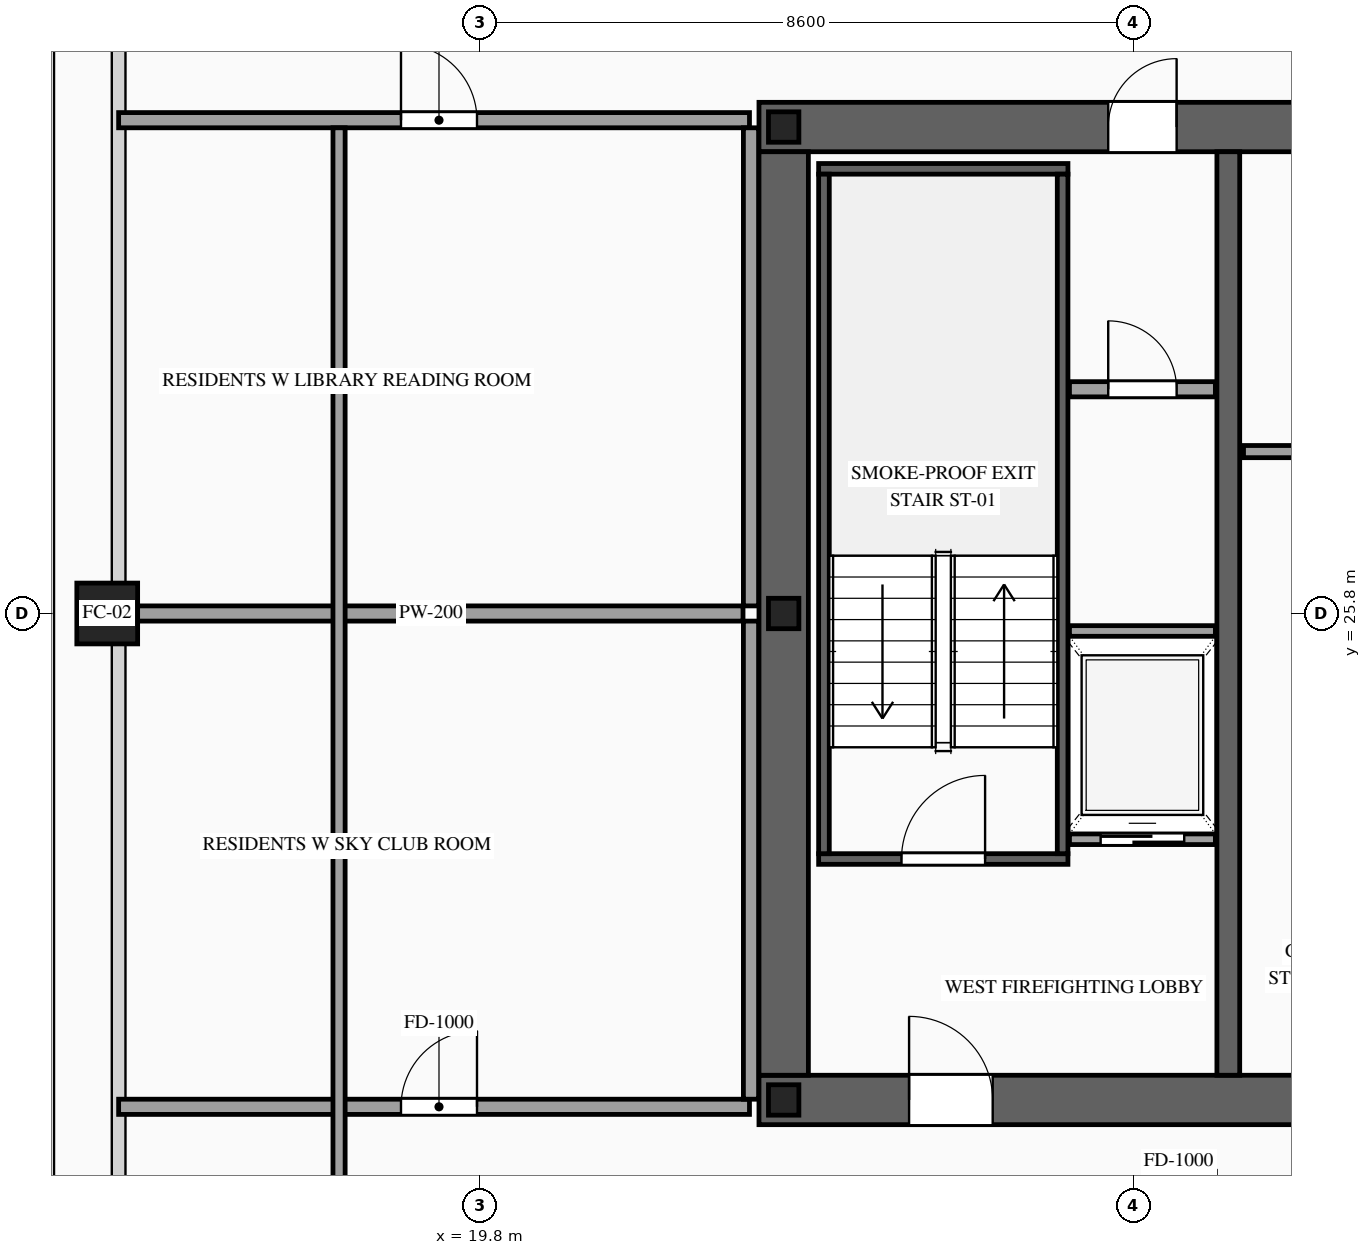
"""IFC4 building model, lengths in metres.
Left out: names, types, materials, properties, quantities, classifications, styles, units other than length and angle.
Written with IfcOpenShell. Run it as: python <this file> out.ifc"""

import sys

from ifc_helpers import new_model, si_unit, direction, frame, frame_2d, origin, origin_2d, place, context, subcontext, project, spatial, rectangle, hollow_rectangle, i_section, extrude, source, transform, mapped, element, fill, save


model = new_model("IFC4")
c1 = context("Model", 3, precision=1e-05, world=origin(), true_north=direction((0.0, 1.0)))
c2 = subcontext(c1, "Body", "Model", "MODEL_VIEW")
j1 = project(units=[si_unit("LENGTHUNIT", "METRE"), si_unit("PLANEANGLEUNIT", "RADIAN")], contexts=[c1])
p1 = place(None, origin())
s1 = spatial("IfcSite", under=j1, at=p1, CompositionType="ELEMENT")
p2 = place(p1, origin())
s2 = spatial("IfcBuilding", under=s1, at=p2, CompositionType="ELEMENT")
p3 = place(p2, frame((0.0, 0.0, 191.5)))
s3 = spatial("IfcBuildingStorey", under=s2, at=p3, CompositionType="ELEMENT", Elevation=191.5)
p4 = place(p3, frame((23.475, 19.4, 0.0), z_axis=(0.0, 0.0, 1.0), x_axis=(1.0, 0.0, 0.0)))
e1 = element("IfcWall", 1, at=p4, inside=s3, PredefinedType="SHEAR", context=c2, shape_type="SweptSolid", body=[
    extrude(rectangle(XDim=27.05, YDim=0.65, at=frame_2d((13.525, 0.0))), origin(), (0.0, 0.0, 1.0), 3.5),
])
p5 = place(p4, frame((1.975, 0.0, 0.0)))
e2 = element("IfcOpeningElement", 2, at=p5, cuts=e1, PredefinedType="OPENING", context=c2, shape_type="SweptSolid", body=[
    extrude(rectangle(XDim=1.1, YDim=2.2, at=frame_2d((0.55, 1.1))), frame((0.0, 0.34, 0.0), z_axis=(0.0, -1.0, 0.0), x_axis=(1.0, 0.0, 0.0)), (0.0, 0.0, 1.0), 0.68),
])
p6 = place(p4, frame((9.875, 0.0, 0.0)))
e3 = element("IfcOpeningElement", 3, at=p6, cuts=e1, PredefinedType="OPENING", context=c2, shape_type="SweptSolid", body=[
    extrude(rectangle(XDim=1.1, YDim=2.2, at=frame_2d((0.55, 1.1))), frame((0.0, 0.34, 0.0), z_axis=(0.0, -1.0, 0.0), x_axis=(1.0, 0.0, 0.0)), (0.0, 0.0, 1.0), 0.68),
])
p7 = place(p4, frame((23.075, 0.0, 0.0)))
e4 = element("IfcOpeningElement", 4, at=p7, cuts=e1, PredefinedType="OPENING", context=c2, shape_type="SweptSolid", body=[
    extrude(rectangle(XDim=1.1, YDim=2.2, at=frame_2d((0.55, 1.1))), frame((0.0, 0.34, 0.0), z_axis=(0.0, -1.0, 0.0), x_axis=(1.0, 0.0, 0.0)), (0.0, 0.0, 1.0), 0.68),
])
p8 = place(p4, frame((19.695, 0.0, 0.0)))
e5 = element("IfcOpeningElement", 5, at=p8, cuts=e1, PredefinedType="OPENING", context=c2, shape_type="SweptSolid", body=[
    extrude(rectangle(XDim=0.9, YDim=2.15, at=frame_2d((0.45, 1.075))), frame((0.0, 0.34, 0.0), z_axis=(0.0, -1.0, 0.0), x_axis=(1.0, 0.0, 0.0)), (0.0, 0.0, 1.0), 0.68),
])
p9 = place(p4, frame((18.255, 0.0, 0.0)))
e6 = element("IfcOpeningElement", 6, at=p9, cuts=e1, PredefinedType="OPENING", context=c2, shape_type="SweptSolid", body=[
    extrude(rectangle(XDim=0.9, YDim=2.15, at=frame_2d((0.45, 1.075))), frame((0.0, 0.34, 0.0), z_axis=(0.0, -1.0, 0.0), x_axis=(1.0, 0.0, 0.0)), (0.0, 0.0, 1.0), 0.68),
])
p10 = place(p3, frame((23.475, 32.2, 0.0), z_axis=(0.0, 0.0, 1.0), x_axis=(1.0, 0.0, 0.0)))
e7 = element("IfcWall", 7, at=p10, inside=s3, PredefinedType="SHEAR", context=c2, shape_type="SweptSolid", body=[
    extrude(rectangle(XDim=27.05, YDim=0.65, at=frame_2d((13.525, 0.0))), origin(), (0.0, 0.0, 1.0), 3.5),
])
p11 = place(p10, frame((4.595, 0.0, 0.0)))
e8 = element("IfcOpeningElement", 8, at=p11, cuts=e7, PredefinedType="OPENING", context=c2, shape_type="SweptSolid", body=[
    extrude(rectangle(XDim=0.9, YDim=2.15, at=frame_2d((0.45, 1.075))), frame((0.0, 0.34, 0.0), z_axis=(0.0, -1.0, 0.0), x_axis=(1.0, 0.0, 0.0)), (0.0, 0.0, 1.0), 0.68),
])
p12 = place(p10, frame((9.875, 0.0, 0.0)))
e9 = element("IfcOpeningElement", 9, at=p12, cuts=e7, PredefinedType="OPENING", context=c2, shape_type="SweptSolid", body=[
    extrude(rectangle(XDim=1.1, YDim=2.2, at=frame_2d((0.55, 1.1))), frame((0.0, 0.34, 0.0), z_axis=(0.0, -1.0, 0.0), x_axis=(1.0, 0.0, 0.0)), (0.0, 0.0, 1.0), 0.68),
])
p13 = place(p10, frame((15.725, 0.0, 0.0)))
e10 = element("IfcOpeningElement", 10, at=p13, cuts=e7, PredefinedType="OPENING", context=c2, shape_type="SweptSolid", body=[
    extrude(rectangle(XDim=1.1, YDim=2.2, at=frame_2d((0.55, 1.1))), frame((0.0, 0.34, 0.0), z_axis=(0.0, -1.0, 0.0), x_axis=(1.0, 0.0, 0.0)), (0.0, 0.0, 1.0), 0.68),
])
p14 = place(p10, frame((18.255, 0.0, 0.0)))
e11 = element("IfcOpeningElement", 11, at=p14, cuts=e7, PredefinedType="OPENING", context=c2, shape_type="SweptSolid", body=[
    extrude(rectangle(XDim=0.9, YDim=2.15, at=frame_2d((0.45, 1.075))), frame((0.0, 0.34, 0.0), z_axis=(0.0, -1.0, 0.0), x_axis=(1.0, 0.0, 0.0)), (0.0, 0.0, 1.0), 0.68),
])
p15 = place(p10, frame((19.695, 0.0, 0.0)))
e12 = element("IfcOpeningElement", 12, at=p15, cuts=e7, PredefinedType="OPENING", context=c2, shape_type="SweptSolid", body=[
    extrude(rectangle(XDim=0.9, YDim=2.15, at=frame_2d((0.45, 1.075))), frame((0.0, 0.34, 0.0), z_axis=(0.0, -1.0, 0.0), x_axis=(1.0, 0.0, 0.0)), (0.0, 0.0, 1.0), 0.68),
])
m1 = source(origin(), c2, "Body", "SweptSolid", [
    extrude(rectangle(XDim=12.15, YDim=0.65, at=frame_2d((6.075, 0.0))), origin(), (0.0, 0.0, 1.0), 3.5),
])
p16 = place(p3, frame((23.8, 19.725, 0.0), z_axis=(0.0, 0.0, 1.0), x_axis=(0.0, 1.0, 0.0)))
e13 = element("IfcWall", 13, at=p16, inside=s3, PredefinedType="SHEAR", context=c2, shape_type="MappedRepresentation", body=[
    mapped(m1, transform((0.0, 0.0, 0.0), scale=1.0)),
])
m2 = source(origin(), c2, "Body", "SweptSolid", [
    extrude(rectangle(XDim=12.15, YDim=0.3, at=frame_2d((6.075, 0.0))), origin(), (0.0, 0.0, 1.0), 3.5),
])
p17 = place(p3, frame((29.65, 19.725, 0.0), z_axis=(0.0, 0.0, 1.0), x_axis=(0.0, 1.0, 0.0)))
e14 = element("IfcWall", 14, at=p17, inside=s3, PredefinedType="SOLIDWALL", context=c2, shape_type="MappedRepresentation", body=[
    mapped(m2, transform((0.0, 0.0, 0.0), scale=1.0)),
])
m3 = source(origin(), c2, "Body", "SweptSolid", [
    extrude(i_section(OverallWidth=0.4, OverallDepth=0.4, WebThickness=0.013, FlangeThickness=0.021, at=origin_2d()), origin(), (0.0, 0.0, 1.0), 3.5),
])
for number, where, z_axis, x_axis in (
    (15, (23.8, 19.4, 0.0), (0.0, 0.0, 1.0), (1.0, 0.0, 0.0)),
    (16, (23.8, 25.8, 0.0), (0.0, 0.0, 1.0), (1.0, 0.0, 0.0)),
    (17, (23.8, 32.2, 0.0), (0.0, 0.0, 1.0), (1.0, 0.0, 0.0)),
):
    element("IfcColumn", number, at=place(p3, frame(where, z_axis=z_axis, x_axis=x_axis)), inside=s3, PredefinedType="COLUMN", context=c2, shape_type="MappedRepresentation", body=[
        mapped(m3, transform((0.0, 0.0, 0.0), scale=1.0)),
    ])
m4 = source(origin(), c2, "Body", "SweptSolid", [
    extrude(hollow_rectangle(XDim=0.8, YDim=0.8, WallThickness=0.036, at=origin_2d()), origin(), (0.0, 0.0, 1.0), 3.5),
])
p18 = place(p3, frame((14.9, 25.8, 0.0), z_axis=(0.0, 0.0, 1.0), x_axis=(1.0, 0.0, 0.0)))
e18 = element("IfcColumn", 18, at=p18, inside=s3, PredefinedType="COLUMN", context=c2, shape_type="MappedRepresentation", body=[
    mapped(m4, transform((0.0, 0.0, 0.0), scale=1.0)),
])
p19 = place(p3, frame((27.56, 22.83, 0.0), z_axis=(0.0, 0.0, 1.0), x_axis=(1.0, 0.0, 0.0)))
e19 = element("IfcWall", 19, at=p19, inside=s3, PredefinedType="SOLIDWALL", context=c2, shape_type="SweptSolid", body=[
    extrude(rectangle(XDim=1.92, YDim=0.14, at=frame_2d((0.96, 0.0))), origin(), (0.0, 0.0, 1.0), 3.28),
])
p20 = place(p19, frame((0.41, 0.0, 0.0)))
e20 = element("IfcOpeningElement", 20, at=p20, cuts=e19, PredefinedType="OPENING", context=c2, shape_type="SweptSolid", body=[
    extrude(rectangle(XDim=1.1, YDim=2.2, at=frame_2d((0.55, 1.1))), frame((0.0, 0.085, 0.0), z_axis=(0.0, -1.0, 0.0), x_axis=(1.0, 0.0, 0.0)), (0.0, 0.0, 1.0), 0.17),
])
m5 = source(origin(), c2, "Body", "SweptSolid", [
    extrude(rectangle(XDim=1.92, YDim=0.14, at=frame_2d((0.96, 0.0))), origin(), (0.0, 0.0, 1.0), 3.28),
])
p21 = place(p3, frame((27.56, 25.57, 0.0), z_axis=(0.0, 0.0, 1.0), x_axis=(1.0, 0.0, 0.0)))
e21 = element("IfcWall", 21, at=p21, inside=s3, PredefinedType="SOLIDWALL", context=c2, shape_type="MappedRepresentation", body=[
    mapped(m5, transform((0.0, 0.0, 0.0), scale=1.0)),
])
p22 = place(p3, frame((24.26, 22.57, 0.0), z_axis=(0.0, 0.0, 1.0), x_axis=(1.0, 0.0, 0.0)))
e22 = element("IfcWall", 22, at=p22, inside=s3, PredefinedType="SOLIDWALL", context=c2, shape_type="SweptSolid", body=[
    extrude(rectangle(XDim=3.28, YDim=0.14, at=frame_2d((1.64, 0.0))), origin(), (0.0, 0.0, 1.0), 3.28),
])
p23 = place(p22, frame((1.09, 0.0, 0.0)))
e23 = element("IfcOpeningElement", 23, at=p23, cuts=e22, PredefinedType="OPENING", context=c2, shape_type="SweptSolid", body=[
    extrude(rectangle(XDim=1.1, YDim=2.2, at=frame_2d((0.55, 1.1))), frame((0.0, 0.085, 0.0), z_axis=(0.0, -1.0, 0.0), x_axis=(1.0, 0.0, 0.0)), (0.0, 0.0, 1.0), 0.17),
])
m6 = source(origin(), c2, "Body", "SweptSolid", [
    extrude(rectangle(XDim=3.28, YDim=0.14, at=frame_2d((1.64, 0.0))), origin(), (0.0, 0.0, 1.0), 3.28),
])
p24 = place(p3, frame((24.26, 31.65, 0.0), z_axis=(0.0, 0.0, 1.0), x_axis=(1.0, 0.0, 0.0)))
e24 = element("IfcWall", 24, at=p24, inside=s3, PredefinedType="SOLIDWALL", context=c2, shape_type="MappedRepresentation", body=[
    mapped(m6, transform((0.0, 0.0, 0.0), scale=1.0)),
])
m7 = source(origin(), c2, "Body", "SweptSolid", [
    extrude(rectangle(XDim=8.94, YDim=0.14, at=frame_2d((4.47, 0.0))), origin(), (0.0, 0.0, 1.0), 3.28),
])
for number, where, z_axis, x_axis in (
    (25, (24.33, 22.64, 0.0), (0.0, 0.0, 1.0), (0.0, 1.0, 0.0)),
    (26, (27.47, 22.64, 0.0), (0.0, 0.0, 1.0), (0.0, 1.0, 0.0)),
):
    element("IfcWall", number, at=place(p3, frame(where, z_axis=z_axis, x_axis=x_axis)), inside=s3, PredefinedType="SOLIDWALL", context=c2, shape_type="MappedRepresentation", body=[
        mapped(m7, transform((0.0, 0.0, 0.0), scale=1.0)),
    ])
p25 = place(p3, frame((27.56, 28.75, 0.0), z_axis=(0.0, 0.0, 1.0), x_axis=(1.0, 0.0, 0.0)))
e27 = element("IfcWall", 27, at=p25, inside=s3, PredefinedType="PARTITIONING", context=c2, shape_type="SweptSolid", body=[
    extrude(rectangle(XDim=1.92, YDim=0.2, at=frame_2d((0.96, 0.0))), origin(), (0.0, 0.0, 1.0), 3.28),
])
p26 = place(p25, frame((0.51, 0.0, 0.0)))
e28 = element("IfcOpeningElement", 28, at=p26, cuts=e27, PredefinedType="OPENING", context=c2, shape_type="SweptSolid", body=[
    extrude(rectangle(XDim=0.9, YDim=2.15, at=frame_2d((0.45, 1.075))), frame((0.0, 0.115, 0.0), z_axis=(0.0, -1.0, 0.0), x_axis=(1.0, 0.0, 0.0)), (0.0, 0.0, 1.0), 0.23),
])
m8 = source(origin(), c2, "Body", "SweptSolid", [
    extrude(rectangle(XDim=2.47, YDim=0.16, at=frame_2d((1.235, 0.0))), origin(), (0.0, 0.0, 1.0), 3.28),
])
p27 = place(p3, frame((29.85, 27.93, 0.0), z_axis=(0.0, 0.0, 1.0), x_axis=(1.0, 0.0, 0.0)))
e29 = element("IfcWall", 29, at=p27, inside=s3, PredefinedType="PARTITIONING", context=c2, shape_type="MappedRepresentation", body=[
    mapped(m8, transform((0.0, 0.0, 0.0), scale=1.0)),
])
p28 = place(p3, frame((15.05, 19.31, 0.0), z_axis=(0.0, 0.0, 1.0), x_axis=(1.0, 0.0, 0.0)))
e30 = element("IfcWall", 30, at=p28, inside=s3, PredefinedType="PARTITIONING", context=c2, shape_type="SweptSolid", body=[
    extrude(rectangle(XDim=8.3, YDim=0.2, at=frame_2d((4.15, 0.0))), origin(), (0.0, 0.0, 1.0), 2.775),
])
p29 = place(p28, frame((3.715, 0.0, 0.0)))
e31 = element("IfcOpeningElement", 31, at=p29, cuts=e30, PredefinedType="OPENING", context=c2, shape_type="SweptSolid", body=[
    extrude(rectangle(XDim=1.0, YDim=2.2, at=frame_2d((0.5, 1.1))), frame((0.0, 0.115, 0.0), z_axis=(0.0, -1.0, 0.0), x_axis=(1.0, 0.0, 0.0)), (0.0, 0.0, 1.0), 0.23),
])
m9 = source(origin(), c2, "Body", "SweptSolid", [
    extrude(rectangle(XDim=8.215, YDim=0.2, at=frame_2d((4.107, 0.0))), origin(), (0.0, 0.0, 1.0), 2.687),
])
p30 = place(p3, frame((15.05, 25.8, 0.0), z_axis=(0.0, 0.0, 1.0), x_axis=(1.0, 0.0, 0.0)))
e32 = element("IfcWall", 32, at=p30, inside=s3, PredefinedType="PARTITIONING", context=c2, shape_type="MappedRepresentation", body=[
    mapped(m9, transform((0.0, 0.0, 0.0), scale=1.0)),
])
m10 = source(origin(), c2, "Body", "SweptSolid", [
    extrude(rectangle(XDim=6.29, YDim=0.2, at=frame_2d((3.145, 0.0))), origin(), (0.0, 0.0, 1.0), 3.28),
])
p31 = place(p3, frame((23.37, 19.41, 0.0), z_axis=(0.0, 0.0, 1.0), x_axis=(0.0, 1.0, 0.0)))
e33 = element("IfcWall", 33, at=p31, inside=s3, PredefinedType="PARTITIONING", context=c2, shape_type="MappedRepresentation", body=[
    mapped(m10, transform((0.0, 0.0, 0.0), scale=1.0)),
])
p32 = place(p3, frame((15.05, 32.29, 0.0), z_axis=(0.0, 0.0, 1.0), x_axis=(1.0, 0.0, 0.0)))
e34 = element("IfcWall", 34, at=p32, inside=s3, PredefinedType="PARTITIONING", context=c2, shape_type="SweptSolid", body=[
    extrude(rectangle(XDim=8.3, YDim=0.2, at=frame_2d((4.15, 0.0))), origin(), (0.0, 0.0, 1.0), 2.775),
])
p33 = place(p32, frame((3.715, 0.0, 0.0)))
e35 = element("IfcOpeningElement", 35, at=p33, cuts=e34, PredefinedType="OPENING", context=c2, shape_type="SweptSolid", body=[
    extrude(rectangle(XDim=1.0, YDim=2.2, at=frame_2d((0.5, 1.1))), frame((0.0, 0.115, 0.0), z_axis=(0.0, -1.0, 0.0), x_axis=(1.0, 0.0, 0.0)), (0.0, 0.0, 1.0), 0.23),
])
m11 = source(origin(), c2, "Body", "SweptSolid", [
    extrude(rectangle(XDim=28.19, YDim=0.16, at=frame_2d((14.095, 0.0))), origin(), (0.0, 0.0, 1.0), 3.28),
])
p34 = place(p3, frame((17.95, 4.0, 0.0), z_axis=(0.0, 0.0, 1.0), x_axis=(0.0, 1.0, 0.0)))
e36 = element("IfcWall", 36, at=p34, inside=s3, PredefinedType="PARTITIONING", context=c2, shape_type="MappedRepresentation", body=[
    mapped(m11, transform((0.0, 0.0, 0.0), scale=1.0)),
])
p35 = place(p3, frame((23.37, 25.9, 0.0), z_axis=(0.0, 0.0, 1.0), x_axis=(0.0, 1.0, 0.0)))
e37 = element("IfcWall", 37, at=p35, inside=s3, PredefinedType="PARTITIONING", context=c2, shape_type="MappedRepresentation", body=[
    mapped(m10, transform((0.0, 0.0, 0.0), scale=1.0)),
])
m12 = source(origin(), c2, "Body", "SweptSolid", [
    extrude(rectangle(XDim=1.1, YDim=2.2, at=frame_2d((0.55, 1.1))), frame((0.0, 0.025, 0.0), z_axis=(0.0, -1.0, 0.0), x_axis=(1.0, 0.0, 0.0)), (0.0, 0.0, 1.0), 0.05),
])
p36 = place(p20, origin())
e38 = element("IfcDoor", 38, at=p36, inside=s3, OperationType="SLIDING_TO_LEFT", PredefinedType="DOOR", context=c2, shape_type="MappedRepresentation", body=[
    mapped(m12, transform((0.0, 0.0, 0.0), scale=1.0)),
])
fill(e20, e38)
m13 = source(origin(), c2, "Body", "SweptSolid", [
    extrude(rectangle(XDim=1.1, YDim=2.2, at=frame_2d((0.55, 1.1))), frame((0.0, 0.025, 0.0), z_axis=(0.0, -1.0, 0.0), x_axis=(1.0, 0.0, 0.0)), (0.0, 0.0, 1.0), 0.05),
])
p37 = place(p23, origin())
e39 = element("IfcDoor", 39, at=p37, inside=s3, OperationType="SINGLE_SWING_RIGHT", PredefinedType="DOOR", context=c2, shape_type="MappedRepresentation", body=[
    mapped(m13, transform((0.0, 0.0, 0.0), scale=1.0)),
])
fill(e23, e39)
p38 = place(p5, origin())
e40 = element("IfcDoor", 40, at=p38, inside=s3, OperationType="SINGLE_SWING_LEFT", PredefinedType="DOOR", context=c2, shape_type="MappedRepresentation", body=[
    mapped(m13, transform((0.0, 0.0, 0.0), scale=1.0)),
])
fill(e2, e40)
m14 = source(origin(), c2, "Body", "SweptSolid", [
    extrude(rectangle(XDim=0.9, YDim=2.15, at=frame_2d((0.45, 1.075))), frame((0.0, 0.025, 0.0), z_axis=(0.0, -1.0, 0.0), x_axis=(1.0, 0.0, 0.0)), (0.0, 0.0, 1.0), 0.05),
])
p39 = place(p11, origin())
e41 = element("IfcDoor", 41, at=p39, inside=s3, OperationType="SINGLE_SWING_RIGHT", PredefinedType="DOOR", context=c2, shape_type="MappedRepresentation", body=[
    mapped(m14, transform((0.0, 0.0, 0.0), scale=1.0)),
])
fill(e8, e41)
p40 = place(p26, origin())
e42 = element("IfcDoor", 42, at=p40, inside=s3, OperationType="SINGLE_SWING_LEFT", PredefinedType="DOOR", context=c2, shape_type="MappedRepresentation", body=[
    mapped(m14, transform((0.0, 0.0, 0.0), scale=1.0)),
])
fill(e28, e42)
m15 = source(origin(), c2, "Body", "SweptSolid", [
    extrude(rectangle(XDim=1.0, YDim=2.2, at=frame_2d((0.5, 1.1))), frame((0.0, 0.025, 0.0), z_axis=(0.0, -1.0, 0.0), x_axis=(1.0, 0.0, 0.0)), (0.0, 0.0, 1.0), 0.05),
])
p41 = place(p29, origin())
e43 = element("IfcDoor", 43, at=p41, inside=s3, OperationType="SINGLE_SWING_RIGHT", PredefinedType="DOOR", context=c2, shape_type="MappedRepresentation", body=[
    mapped(m15, transform((0.0, 0.0, 0.0), scale=1.0)),
])
fill(e31, e43)
p42 = place(p33, origin())
e44 = element("IfcDoor", 44, at=p42, inside=s3, OperationType="SINGLE_SWING_LEFT", PredefinedType="DOOR", context=c2, shape_type="MappedRepresentation", body=[
    mapped(m15, transform((0.0, 0.0, 0.0), scale=1.0)),
])
fill(e35, e44)
save(model, sys.argv[1])
